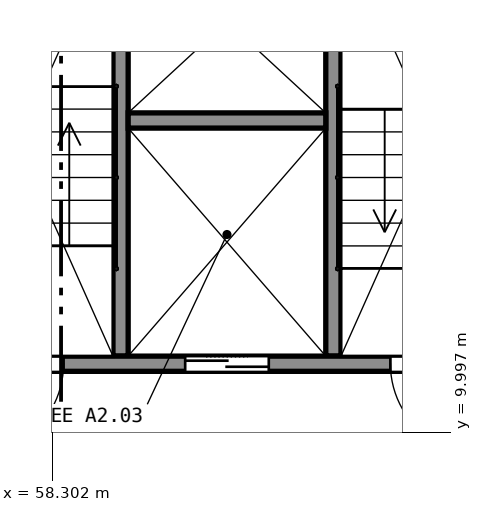
"""IFC4 building model, lengths in metres.
Left out: names, types, materials, properties, quantities, classifications, styles, units other than length and angle.
Written with IfcOpenShell. Run it as: python <this file> out.ifc"""

import sys

from ifc_helpers import new_model, si_unit, direction, frame, frame_2d, origin, place, context, subcontext, project, spatial, rectangle, extrude, element, fill, save


model = new_model("IFC4")
c1 = context("Model", 3, precision=1e-05, world=origin(), true_north=direction((0.0, 1.0)))
c2 = subcontext(c1, "Body", "Model", "MODEL_VIEW")
j1 = project(units=[si_unit("LENGTHUNIT", "METRE"), si_unit("PLANEANGLEUNIT", "RADIAN")], contexts=[c1])
p1 = place(None, origin())
s1 = spatial("IfcSite", under=j1, at=p1, CompositionType="ELEMENT")
p2 = place(p1, origin())
s2 = spatial("IfcBuilding", under=s1, at=p2, CompositionType="ELEMENT")
p3 = place(p2, frame((0.0, 0.0, 10.5)))
s3 = spatial("IfcBuildingStorey", under=s2, at=p3, CompositionType="ELEMENT", Elevation=10.5)
p4 = place(p3, frame((56.6, 10.9, 0.0), z_axis=(0.0, 0.0, 1.0), x_axis=(1.0, 0.0, 0.0)))
e1 = element("IfcWall", 1, at=p4, inside=s3, PredefinedType="SHEAR", context=c2, shape_type="SweptSolid", body=[
    extrude(rectangle(XDim=8.0, YDim=0.2, at=frame_2d((4.0, 0.0))), origin(), (0.0, 0.0, 1.0), 9.5),
])
p5 = place(p4, frame((0.65, 0.0, 0.0)))
e2 = element("IfcOpeningElement", 2, at=p5, cuts=e1, PredefinedType="OPENING", context=c2, shape_type="SweptSolid", body=[
    extrude(rectangle(XDim=1.2, YDim=2.1, at=frame_2d((0.6, 1.05))), frame((0.0, 0.11, 0.0), z_axis=(0.0, -1.0, 0.0), x_axis=(1.0, 0.0, 0.0)), (0.0, 0.0, 1.0), 0.22),
])
p6 = place(p4, frame((6.15, 0.0, 0.0)))
e3 = element("IfcOpeningElement", 3, at=p6, cuts=e1, PredefinedType="OPENING", context=c2, shape_type="SweptSolid", body=[
    extrude(rectangle(XDim=1.2, YDim=2.1, at=frame_2d((0.6, 1.05))), frame((0.0, 0.11, 0.0), z_axis=(0.0, -1.0, 0.0), x_axis=(1.0, 0.0, 0.0)), (0.0, 0.0, 1.0), 0.22),
])
p7 = place(p4, frame((3.45, 0.0, 0.0)))
e4 = element("IfcOpeningElement", 4, at=p7, cuts=e1, PredefinedType="OPENING", context=c2, shape_type="SweptSolid", body=[
    extrude(rectangle(XDim=1.1, YDim=2.1, at=frame_2d((0.55, 1.05))), frame((0.0, 0.11, 0.0), z_axis=(0.0, -1.0, 0.0), x_axis=(1.0, 0.0, 0.0)), (0.0, 0.0, 1.0), 0.22),
])
for number, where, z_axis, x_axis in (
    (5, (59.2, 11.0, 0.0), (0.0, 0.0, 1.0), (0.0, 1.0, 0.0)),
    (6, (62.0, 11.0, 0.0), (0.0, 0.0, 1.0), (0.0, 1.0, 0.0)),
):
    element("IfcWall", number, at=place(p3, frame(where, z_axis=z_axis, x_axis=x_axis)), inside=s3, PredefinedType="SHEAR", context=c2, shape_type="SweptSolid", body=[
        extrude(rectangle(XDim=5.6, YDim=0.2, at=frame_2d((2.8, 0.0))), origin(), (0.0, 0.0, 1.0), 9.5),
    ])
p8 = place(p3, frame((59.3, 14.1, 0.0), z_axis=(0.0, 0.0, 1.0), x_axis=(1.0, 0.0, 0.0)))
e7 = element("IfcWall", 7, at=p8, inside=s3, PredefinedType="SHEAR", context=c2, shape_type="SweptSolid", body=[
    extrude(rectangle(XDim=2.6, YDim=0.2, at=frame_2d((1.3, 0.0))), origin(), (0.0, 0.0, 1.0), 9.5),
])
p9 = place(p5, origin())
e8 = element("IfcDoor", 8, at=p9, inside=s3, OperationType="SINGLE_SWING_LEFT", PredefinedType="DOOR", context=c2, shape_type="SweptSolid", body=[
    extrude(rectangle(XDim=1.2, YDim=2.1, at=frame_2d((0.6, 1.05))), frame((0.0, 0.025, 0.0), z_axis=(0.0, -1.0, 0.0), x_axis=(1.0, 0.0, 0.0)), (0.0, 0.0, 1.0), 0.05),
])
fill(e2, e8)
p10 = place(p6, origin())
e9 = element("IfcDoor", 9, at=p10, inside=s3, OperationType="SINGLE_SWING_RIGHT", PredefinedType="DOOR", context=c2, shape_type="SweptSolid", body=[
    extrude(rectangle(XDim=1.2, YDim=2.1, at=frame_2d((0.6, 1.05))), frame((0.0, 0.025, 0.0), z_axis=(0.0, -1.0, 0.0), x_axis=(1.0, 0.0, 0.0)), (0.0, 0.0, 1.0), 0.05),
])
fill(e3, e9)
p11 = place(p7, origin())
e10 = element("IfcDoor", 10, at=p11, inside=s3, OperationType="DOUBLE_DOOR_SLIDING", PredefinedType="DOOR", context=c2, shape_type="SweptSolid", body=[
    extrude(rectangle(XDim=1.1, YDim=2.1, at=frame_2d((0.55, 1.05))), frame((0.0, 0.025, 0.0), z_axis=(0.0, -1.0, 0.0), x_axis=(1.0, 0.0, 0.0)), (0.0, 0.0, 1.0), 0.05),
])
fill(e4, e10)
save(model, sys.argv[1])
